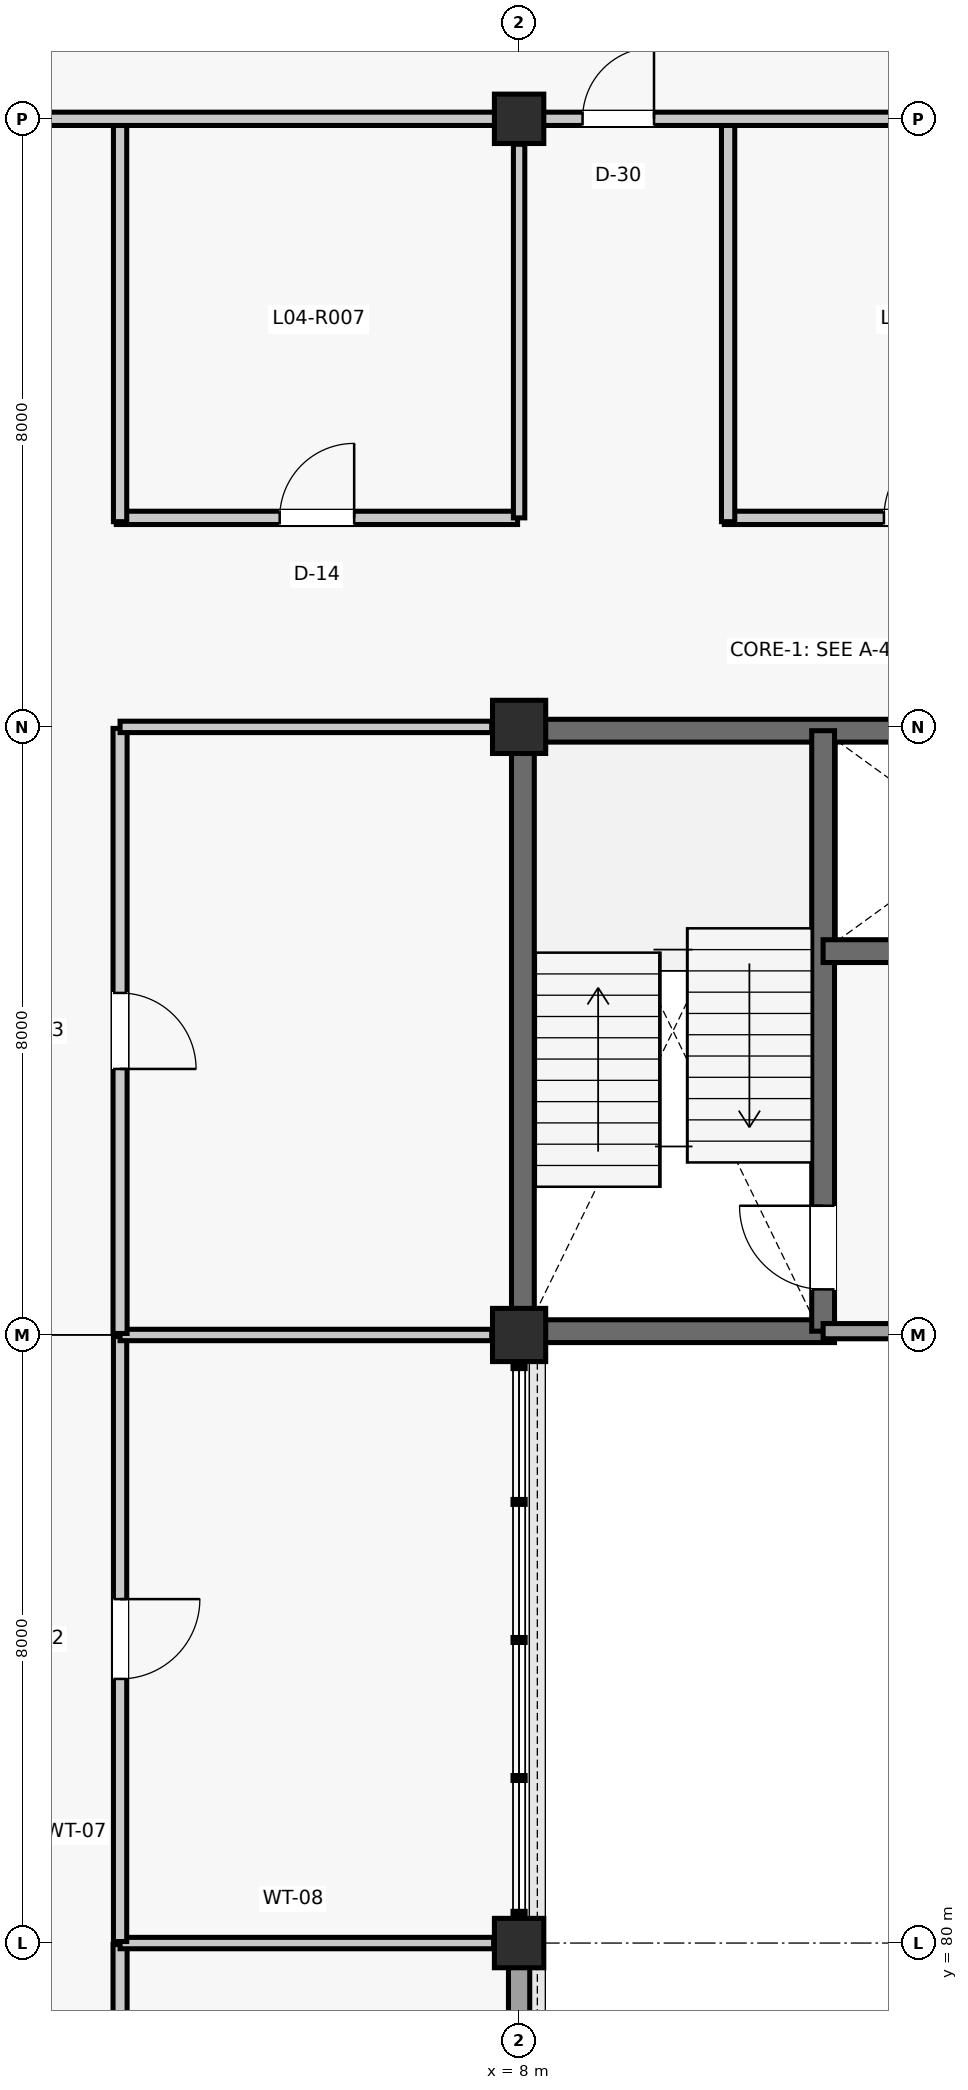
"""IFC4 building model, lengths in metres.
Left out: names, types, materials, properties, quantities, classifications, styles, units other than length and angle.
Written with IfcOpenShell. Run it as: python <this file> out.ifc"""

import sys

from ifc_helpers import new_model, si_unit, direction, frame, frame_2d, origin, origin_2d, place, context, subcontext, project, spatial, rectangle, extrude, element, fill, save


model = new_model("IFC4")
c1 = context("Model", 3, precision=1e-05, world=origin(), true_north=direction((0.0, 1.0)))
c2 = subcontext(c1, "Body", "Model", "MODEL_VIEW")
j1 = project(units=[si_unit("LENGTHUNIT", "METRE"), si_unit("PLANEANGLEUNIT", "RADIAN")], contexts=[c1])
p1 = place(None, origin())
s1 = spatial("IfcSite", under=j1, at=p1, CompositionType="ELEMENT")
p2 = place(p1, origin())
s2 = spatial("IfcBuilding", under=s1, at=p2, CompositionType="ELEMENT")
p3 = place(p2, frame((0.0, 0.0, 17.82)))
s3 = spatial("IfcBuildingStorey", under=s2, at=p3, CompositionType="ELEMENT", Elevation=17.82)
p4 = place(p3, frame((8.0, 80.0, 0.0), z_axis=(0.0, 0.0, 1.0), x_axis=(1.0, 0.0, 0.0)))
e1 = element("IfcColumn", 1, at=p4, inside=s3, PredefinedType="COLUMN", context=c2, shape_type="SweptSolid", body=[
    extrude(rectangle(XDim=0.65, YDim=0.65, at=origin_2d()), origin(), (0.0, 0.0, 1.0), 3.96),
])
for number, where, z_axis, x_axis in (
    (2, (8.0, 88.0, 0.0), (0.0, 0.0, 1.0), (1.0, 0.0, 0.0)),
    (3, (8.0, 96.0, 0.0), (0.0, 0.0, 1.0), (1.0, 0.0, 0.0)),
):
    element("IfcColumn", number, at=place(p3, frame(where, z_axis=z_axis, x_axis=x_axis)), inside=s3, PredefinedType="COLUMN", context=c2, shape_type="SweptSolid", body=[
        extrude(rectangle(XDim=0.7, YDim=0.7, at=origin_2d()), origin(), (0.0, 0.0, 1.0), 3.96),
    ])
p5 = place(p3, frame((8.0, 104.0, 0.0), z_axis=(0.0, 0.0, 1.0), x_axis=(1.0, 0.0, 0.0)))
e4 = element("IfcColumn", 4, at=p5, inside=s3, PredefinedType="COLUMN", context=c2, shape_type="SweptSolid", body=[
    extrude(rectangle(XDim=0.65, YDim=0.65, at=origin_2d()), origin(), (0.0, 0.0, 1.0), 3.96),
])
p6 = place(p3, frame((8.0, 72.26, 0.0), z_axis=(0.0, 0.0, 1.0), x_axis=(0.0, 1.0, 0.0)))
e5 = element("IfcWall", 5, at=p6, inside=s3, PredefinedType="SOLIDWALL", context=c2, shape_type="SweptSolid", body=[
    extrude(rectangle(XDim=7.43, YDim=0.28, at=frame_2d((3.715, 0.0))), origin(), (0.0, 0.0, 1.0), 3.309),
])
p7 = place(p6, frame((2.615, 0.0, 0.9)))
e6 = element("IfcOpeningElement", 6, at=p7, cuts=e5, PredefinedType="OPENING", context=c2, shape_type="SweptSolid", body=[
    extrude(rectangle(XDim=2.2, YDim=2.0, at=frame_2d((1.1, 1.0))), frame((0.0, 0.15, 0.0), z_axis=(0.0, -1.0, 0.0), x_axis=(1.0, 0.0, 0.0)), (0.0, 0.0, 1.0), 0.3),
])
p8 = place(p3, frame((8.05, 88.24, 0.0), z_axis=(0.0, 0.0, 1.0), x_axis=(0.0, 1.0, 0.0)))
e7 = element("IfcWall", 7, at=p8, inside=s3, PredefinedType="SHEAR", context=c2, shape_type="SweptSolid", body=[
    extrude(rectangle(XDim=7.52, YDim=0.3, at=frame_2d((3.76, 0.0))), origin(), (0.0, 0.0, 1.0), 3.257),
])
p9 = place(p3, frame((8.24, 95.95, 0.0), z_axis=(0.0, 0.0, 1.0), x_axis=(1.0, 0.0, 0.0)))
e8 = element("IfcWall", 8, at=p9, inside=s3, PredefinedType="SHEAR", context=c2, shape_type="SweptSolid", body=[
    extrude(rectangle(XDim=7.52, YDim=0.3, at=frame_2d((3.76, 0.0))), origin(), (0.0, 0.0, 1.0), 3.263),
])
p10 = place(p3, frame((8.24, 88.05, 0.0), z_axis=(0.0, 0.0, 1.0), x_axis=(1.0, 0.0, 0.0)))
e9 = element("IfcWall", 9, at=p10, inside=s3, PredefinedType="SHEAR", context=c2, shape_type="SweptSolid", body=[
    extrude(rectangle(XDim=3.91, YDim=0.3, at=frame_2d((1.955, 0.0))), origin(), (0.0, 0.0, 1.0), 3.303),
])
p11 = place(p3, frame((12.0, 88.05, 0.0), z_axis=(0.0, 0.0, 1.0), x_axis=(0.0, 1.0, 0.0)))
e10 = element("IfcWall", 10, at=p11, inside=s3, PredefinedType="SHEAR", context=c2, shape_type="SweptSolid", body=[
    extrude(rectangle(XDim=7.9, YDim=0.3, at=frame_2d((3.95, 0.0))), origin(), (0.0, 0.0, 1.0), 3.263),
])
p12 = place(p11, frame((0.55, 0.0, 0.0)))
e11 = element("IfcOpeningElement", 11, at=p12, cuts=e10, PredefinedType="OPENING", context=c2, shape_type="SweptSolid", body=[
    extrude(rectangle(XDim=1.1, YDim=2.15, at=frame_2d((0.55, 1.075))), frame((0.0, 0.16, 0.0), z_axis=(0.0, -1.0, 0.0), x_axis=(1.0, 0.0, 0.0)), (0.0, 0.0, 1.0), 0.32),
])
p13 = place(p3, frame((12.0, 93.05, 0.0), z_axis=(0.0, 0.0, 1.0), x_axis=(1.0, 0.0, 0.0)))
e12 = element("IfcWall", 12, at=p13, inside=s3, PredefinedType="SHEAR", context=c2, shape_type="SweptSolid", body=[
    extrude(rectangle(XDim=3.95, YDim=0.3, at=frame_2d((1.975, 0.0))), origin(), (0.0, 0.0, 1.0), 3.263),
])
p14 = place(p13, frame((1.375, 0.0, 0.0)))
e13 = element("IfcOpeningElement", 13, at=p14, cuts=e12, PredefinedType="OPENING", context=c2, shape_type="SweptSolid", body=[
    extrude(rectangle(XDim=1.2, YDim=2.2, at=frame_2d((0.6, 1.1))), frame((0.0, 0.16, 0.0), z_axis=(0.0, -1.0, 0.0), x_axis=(1.0, 0.0, 0.0)), (0.0, 0.0, 1.0), 0.32),
])
p15 = place(p3, frame((12.0, 88.05, 0.0), z_axis=(0.0, 0.0, 1.0), x_axis=(1.0, 0.0, 0.0)))
e14 = element("IfcWall", 14, at=p15, inside=s3, PredefinedType="PARTITIONING", context=c2, shape_type="SweptSolid", body=[
    extrude(rectangle(XDim=3.66, YDim=0.2, at=frame_2d((1.83, 0.0))), origin(), (0.0, 0.0, 1.0), 3.303),
])
p16 = place(p3, frame((2.75, 72.02, 0.0), z_axis=(0.0, 0.0, 1.0), x_axis=(0.0, 1.0, 0.0)))
e15 = element("IfcWall", 15, at=p16, inside=s3, PredefinedType="PARTITIONING", context=c2, shape_type="SweptSolid", body=[
    extrude(rectangle(XDim=7.96, YDim=0.185, at=frame_2d((3.98, 0.0))), origin(), (0.0, 0.0, 1.0), 3.238),
])
p17 = place(p16, frame((3.51, 0.0, 0.0)))
e16 = element("IfcOpeningElement", 16, at=p17, cuts=e15, PredefinedType="OPENING", context=c2, shape_type="SweptSolid", body=[
    extrude(rectangle(XDim=0.94, YDim=2.12, at=frame_2d((0.47, 1.06))), frame((0.0, 0.103, 0.0), z_axis=(0.0, -1.0, 0.0), x_axis=(1.0, 0.0, 0.0)), (0.0, 0.0, 1.0), 0.205),
])
p18 = place(p3, frame((2.75, 80.0, 0.0), z_axis=(0.0, 0.0, 1.0), x_axis=(1.0, 0.0, 0.0)))
e17 = element("IfcWall", 17, at=p18, inside=s3, PredefinedType="PARTITIONING", context=c2, shape_type="SweptSolid", body=[
    extrude(rectangle(XDim=4.915, YDim=0.15, at=frame_2d((2.458, 0.0))), origin(), (0.0, 0.0, 1.0), 3.246),
])
p19 = place(p3, frame((2.75, 80.02, 0.0), z_axis=(0.0, 0.0, 1.0), x_axis=(0.0, 1.0, 0.0)))
e18 = element("IfcWall", 18, at=p19, inside=s3, PredefinedType="PARTITIONING", context=c2, shape_type="SweptSolid", body=[
    extrude(rectangle(XDim=7.96, YDim=0.175, at=frame_2d((3.98, 0.0))), origin(), (0.0, 0.0, 1.0), 3.246),
])
p20 = place(p19, frame((3.455, 0.0, 0.0)))
e19 = element("IfcOpeningElement", 19, at=p20, cuts=e18, PredefinedType="OPENING", context=c2, shape_type="SweptSolid", body=[
    extrude(rectangle(XDim=1.05, YDim=2.15, at=frame_2d((0.525, 1.075))), frame((0.0, 0.097, 0.0), z_axis=(0.0, -1.0, 0.0), x_axis=(1.0, 0.0, 0.0)), (0.0, 0.0, 1.0), 0.195),
])
p21 = place(p3, frame((2.75, 88.0, 0.0), z_axis=(0.0, 0.0, 1.0), x_axis=(1.0, 0.0, 0.0)))
e20 = element("IfcWall", 20, at=p21, inside=s3, PredefinedType="PARTITIONING", context=c2, shape_type="SweptSolid", body=[
    extrude(rectangle(XDim=4.89, YDim=0.15, at=frame_2d((2.445, 0.0))), origin(), (0.0, 0.0, 1.0), 3.457),
])
p22 = place(p3, frame((2.75, 88.02, 0.0), z_axis=(0.0, 0.0, 1.0), x_axis=(0.0, 1.0, 0.0)))
e21 = element("IfcWall", 21, at=p22, inside=s3, PredefinedType="PARTITIONING", context=c2, shape_type="SweptSolid", body=[
    extrude(rectangle(XDim=7.96, YDim=0.185, at=frame_2d((3.98, 0.0))), origin(), (0.0, 0.0, 1.0), 3.257),
])
p23 = place(p22, frame((3.48, 0.0, 0.0)))
e22 = element("IfcOpeningElement", 22, at=p23, cuts=e21, PredefinedType="OPENING", context=c2, shape_type="SweptSolid", body=[
    extrude(rectangle(XDim=1.0, YDim=2.15, at=frame_2d((0.5, 1.075))), frame((0.0, 0.103, 0.0), z_axis=(0.0, -1.0, 0.0), x_axis=(1.0, 0.0, 0.0)), (0.0, 0.0, 1.0), 0.205),
])
p24 = place(p3, frame((2.75, 96.0, 0.0), z_axis=(0.0, 0.0, 1.0), x_axis=(1.0, 0.0, 0.0)))
e23 = element("IfcWall", 23, at=p24, inside=s3, PredefinedType="PARTITIONING", context=c2, shape_type="SweptSolid", body=[
    extrude(rectangle(XDim=4.89, YDim=0.15, at=frame_2d((2.445, 0.0))), origin(), (0.0, 0.0, 1.0), 3.257),
])
p25 = place(p3, frame((2.7, 98.75, 0.0), z_axis=(0.0, 0.0, 1.0), x_axis=(1.0, 0.0, 0.0)))
e24 = element("IfcWall", 24, at=p25, inside=s3, PredefinedType="PARTITIONING", context=c2, shape_type="SweptSolid", body=[
    extrude(rectangle(XDim=5.28, YDim=0.175, at=frame_2d((2.64, 0.0))), origin(), (0.0, 0.0, 1.0), 3.263),
])
p26 = place(p25, frame((2.15, 0.0, 0.0)))
e25 = element("IfcOpeningElement", 25, at=p26, cuts=e24, PredefinedType="OPENING", context=c2, shape_type="SweptSolid", body=[
    extrude(rectangle(XDim=0.98, YDim=2.15, at=frame_2d((0.49, 1.075))), frame((0.0, 0.097, 0.0), z_axis=(0.0, -1.0, 0.0), x_axis=(1.0, 0.0, 0.0)), (0.0, 0.0, 1.0), 0.195),
])
p27 = place(p3, frame((2.75, 98.7, 0.0), z_axis=(0.0, 0.0, 1.0), x_axis=(0.0, 1.0, 0.0)))
e26 = element("IfcWall", 26, at=p27, inside=s3, PredefinedType="PARTITIONING", context=c2, shape_type="SweptSolid", body=[
    extrude(rectangle(XDim=5.28, YDim=0.175, at=frame_2d((2.64, 0.0))), origin(), (0.0, 0.0, 1.0), 3.263),
])
p28 = place(p3, frame((8.0, 98.75, 0.0), z_axis=(0.0, 0.0, 1.0), x_axis=(0.0, 1.0, 0.0)))
e27 = element("IfcWall", 27, at=p28, inside=s3, PredefinedType="PARTITIONING", context=c2, shape_type="SweptSolid", body=[
    extrude(rectangle(XDim=4.915, YDim=0.15, at=frame_2d((2.458, 0.0))), origin(), (0.0, 0.0, 1.0), 3.263),
])
p29 = place(p3, frame((10.7, 98.75, 0.0), z_axis=(0.0, 0.0, 1.0), x_axis=(1.0, 0.0, 0.0)))
e28 = element("IfcWall", 28, at=p29, inside=s3, PredefinedType="PARTITIONING", context=c2, shape_type="SweptSolid", body=[
    extrude(rectangle(XDim=5.28, YDim=0.175, at=frame_2d((2.64, 0.0))), origin(), (0.0, 0.0, 1.0), 3.402),
])
p30 = place(p29, frame((2.1, 0.0, 0.0)))
e29 = element("IfcOpeningElement", 29, at=p30, cuts=e28, PredefinedType="OPENING", context=c2, shape_type="SweptSolid", body=[
    extrude(rectangle(XDim=1.08, YDim=2.2, at=frame_2d((0.54, 1.1))), frame((0.0, 0.097, 0.0), z_axis=(0.0, -1.0, 0.0), x_axis=(1.0, 0.0, 0.0)), (0.0, 0.0, 1.0), 0.195),
])
p31 = place(p3, frame((10.75, 98.7, 0.0), z_axis=(0.0, 0.0, 1.0), x_axis=(0.0, 1.0, 0.0)))
e30 = element("IfcWall", 30, at=p31, inside=s3, PredefinedType="PARTITIONING", context=c2, shape_type="SweptSolid", body=[
    extrude(rectangle(XDim=5.28, YDim=0.175, at=frame_2d((2.64, 0.0))), origin(), (0.0, 0.0, 1.0), 3.251),
])
p32 = place(p3, frame((0.315, 104.0, 0.0), z_axis=(0.0, 0.0, 1.0), x_axis=(1.0, 0.0, 0.0)))
e31 = element("IfcWall", 31, at=p32, inside=s3, PredefinedType="PARTITIONING", context=c2, shape_type="SweptSolid", body=[
    extrude(rectangle(XDim=7.37, YDim=0.175, at=frame_2d((3.685, 0.0))), origin(), (0.0, 0.0, 1.0), 3.263),
])
p33 = place(p32, frame((0.52, 0.0, 0.0)))
e32 = element("IfcOpeningElement", 32, at=p33, cuts=e31, PredefinedType="OPENING", context=c2, shape_type="SweptSolid", body=[
    extrude(rectangle(XDim=0.94, YDim=2.12, at=frame_2d((0.47, 1.06))), frame((0.0, 0.097, 0.0), z_axis=(0.0, -1.0, 0.0), x_axis=(1.0, 0.0, 0.0)), (0.0, 0.0, 1.0), 0.195),
])
p34 = place(p3, frame((8.315, 104.0, 0.0), z_axis=(0.0, 0.0, 1.0), x_axis=(1.0, 0.0, 0.0)))
e33 = element("IfcWall", 33, at=p34, inside=s3, PredefinedType="PARTITIONING", context=c2, shape_type="SweptSolid", body=[
    extrude(rectangle(XDim=7.37, YDim=0.175, at=frame_2d((3.685, 0.0))), origin(), (0.0, 0.0, 1.0), 3.251),
])
p35 = place(p34, frame((0.52, 0.0, 0.0)))
e34 = element("IfcOpeningElement", 34, at=p35, cuts=e33, PredefinedType="OPENING", context=c2, shape_type="SweptSolid", body=[
    extrude(rectangle(XDim=0.94, YDim=2.12, at=frame_2d((0.47, 1.06))), frame((0.0, 0.097, 0.0), z_axis=(0.0, -1.0, 0.0), x_axis=(1.0, 0.0, 0.0)), (0.0, 0.0, 1.0), 0.195),
])
p36 = place(p12, origin())
e35 = element("IfcDoor", 35, at=p36, inside=s3, OperationType="SINGLE_SWING_RIGHT", PredefinedType="DOOR", context=c2, shape_type="SweptSolid", body=[
    extrude(rectangle(XDim=1.1, YDim=2.15, at=frame_2d((0.55, 1.075))), frame((0.0, 0.025, 0.0), z_axis=(0.0, -1.0, 0.0), x_axis=(1.0, 0.0, 0.0)), (0.0, 0.0, 1.0), 0.05),
])
fill(e11, e35)
p37 = place(p20, frame((1.05, 0.0, 0.0), z_axis=(0.0, 0.0, 1.0), x_axis=(-1.0, 0.0, 0.0)))
e36 = element("IfcDoor", 36, at=p37, inside=s3, OperationType="SINGLE_SWING_RIGHT", PredefinedType="DOOR", context=c2, shape_type="SweptSolid", body=[
    extrude(rectangle(XDim=1.05, YDim=2.15, at=frame_2d((0.525, 1.075))), frame((0.0, 0.025, 0.0), z_axis=(0.0, -1.0, 0.0), x_axis=(1.0, 0.0, 0.0)), (0.0, 0.0, 1.0), 0.05),
])
fill(e19, e36)
p38 = place(p23, frame((1.0, 0.0, 0.0), z_axis=(0.0, 0.0, 1.0), x_axis=(-1.0, 0.0, 0.0)))
e37 = element("IfcDoor", 37, at=p38, inside=s3, OperationType="SINGLE_SWING_LEFT", PredefinedType="DOOR", context=c2, shape_type="SweptSolid", body=[
    extrude(rectangle(XDim=1.0, YDim=2.15, at=frame_2d((0.5, 1.075))), frame((0.0, 0.025, 0.0), z_axis=(0.0, -1.0, 0.0), x_axis=(1.0, 0.0, 0.0)), (0.0, 0.0, 1.0), 0.05),
])
fill(e22, e37)
p39 = place(p26, origin())
e38 = element("IfcDoor", 38, at=p39, inside=s3, OperationType="SINGLE_SWING_RIGHT", PredefinedType="DOOR", context=c2, shape_type="SweptSolid", body=[
    extrude(rectangle(XDim=0.98, YDim=2.15, at=frame_2d((0.49, 1.075))), frame((0.0, 0.025, 0.0), z_axis=(0.0, -1.0, 0.0), x_axis=(1.0, 0.0, 0.0)), (0.0, 0.0, 1.0), 0.05),
])
fill(e25, e38)
p40 = place(p30, origin())
e39 = element("IfcDoor", 39, at=p40, inside=s3, OperationType="SINGLE_SWING_RIGHT", PredefinedType="DOOR", context=c2, shape_type="SweptSolid", body=[
    extrude(rectangle(XDim=1.08, YDim=2.2, at=frame_2d((0.54, 1.1))), frame((0.0, 0.025, 0.0), z_axis=(0.0, -1.0, 0.0), x_axis=(1.0, 0.0, 0.0)), (0.0, 0.0, 1.0), 0.05),
])
fill(e29, e39)
p41 = place(p35, origin())
e40 = element("IfcDoor", 40, at=p41, inside=s3, OperationType="SINGLE_SWING_RIGHT", PredefinedType="DOOR", context=c2, shape_type="SweptSolid", body=[
    extrude(rectangle(XDim=0.94, YDim=2.12, at=frame_2d((0.47, 1.06))), frame((0.0, 0.025, 0.0), z_axis=(0.0, -1.0, 0.0), x_axis=(1.0, 0.0, 0.0)), (0.0, 0.0, 1.0), 0.05),
])
fill(e34, e40)
save(model, sys.argv[1])
